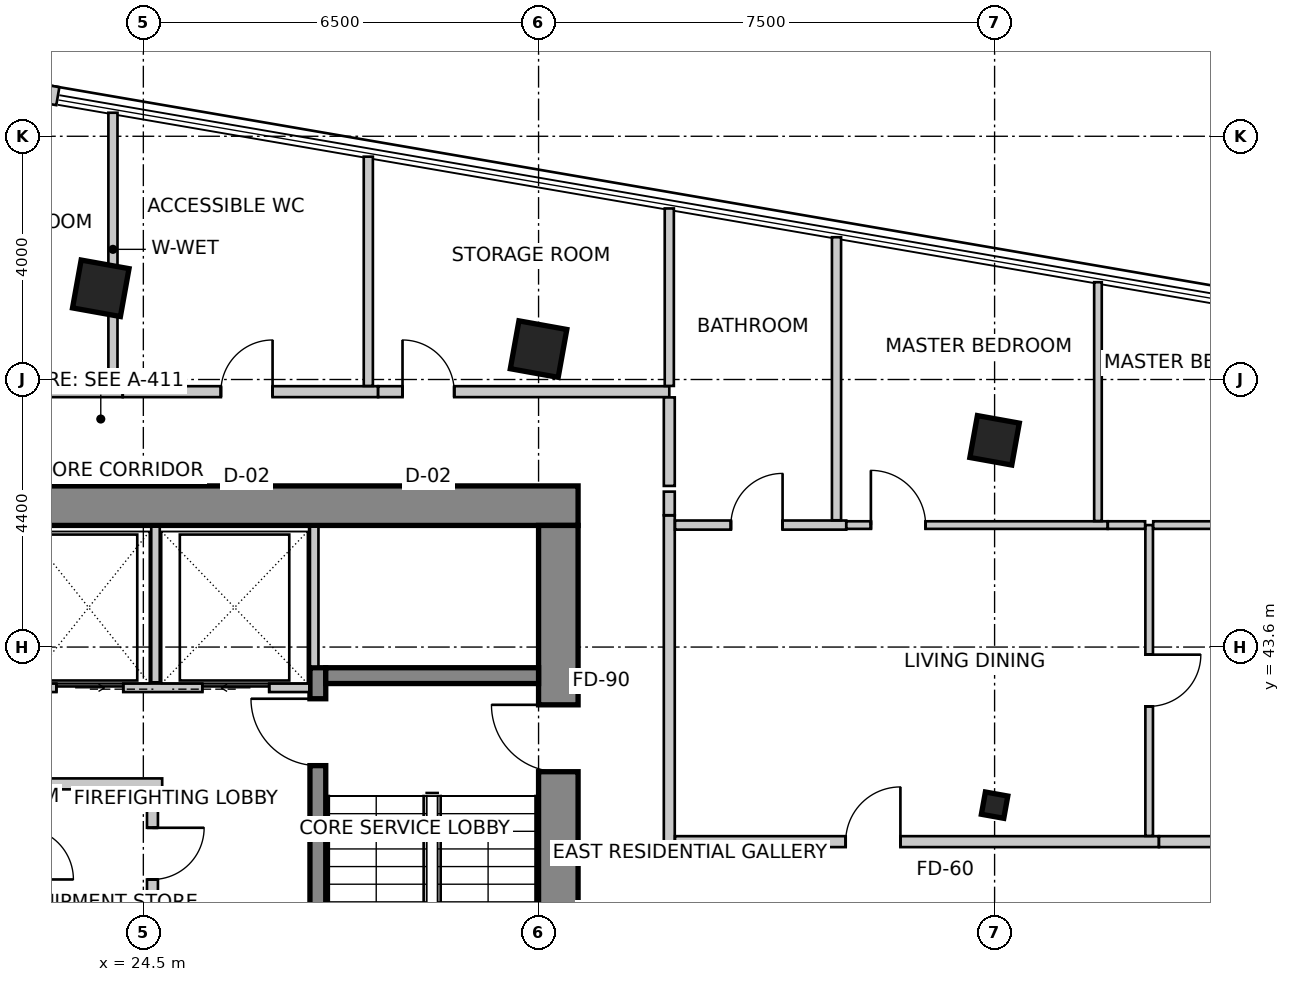
"""IFC4 building model, lengths in metres.
Left out: names, types, materials, properties, quantities, classifications, styles, units other than length and angle.
Written with IfcOpenShell. Run it as: python <this file> out.ifc"""

import sys

from ifc_helpers import new_model, si_unit, direction, frame, frame_2d, origin, origin_2d, place, context, subcontext, project, spatial, rectangle, i_section, extrude, source, transform, mapped, element, fill, save


model = new_model("IFC4")
c1 = context("Model", 3, precision=1e-05, world=origin(), true_north=direction((0.0, 1.0)))
c2 = subcontext(c1, "Body", "Model", "MODEL_VIEW")
j1 = project(units=[si_unit("LENGTHUNIT", "METRE"), si_unit("PLANEANGLEUNIT", "RADIAN")], contexts=[c1])
p1 = place(None, origin())
s1 = spatial("IfcSite", under=j1, at=p1, CompositionType="ELEMENT")
p2 = place(p1, origin())
s2 = spatial("IfcBuilding", under=s1, at=p2, CompositionType="ELEMENT")
p3 = place(p2, frame((0.0, 0.0, 197.4)))
s3 = spatial("IfcBuildingStorey", under=s2, at=p3, CompositionType="ELEMENT", Elevation=197.4)
p4 = place(p3, frame((15.95, 45.925, 0.0), z_axis=(0.0, 0.0, 1.0), x_axis=(1.0, 0.0, 0.0)))
e1 = element("IfcWall", 1, at=p4, inside=s3, PredefinedType="SHEAR", context=c2, shape_type="SweptSolid", body=[
    extrude(rectangle(XDim=15.7, YDim=0.65, at=frame_2d((7.85, 0.0))), origin(), (0.0, 0.0, 1.0), 3.5),
])
p5 = place(p3, frame((31.325, 34.2, 0.0), z_axis=(0.0, 0.0, 1.0), x_axis=(0.0, 1.0, 0.0)))
e2 = element("IfcWall", 2, at=p5, inside=s3, PredefinedType="SHEAR", context=c2, shape_type="SweptSolid", body=[
    extrude(rectangle(XDim=11.4, YDim=0.65, at=frame_2d((5.7, 0.0))), origin(), (0.0, 0.0, 1.0), 3.5),
])
m1 = source(origin(), c2, "Body", "SweptSolid", [
    extrude(rectangle(XDim=1.1, YDim=2.15, at=frame_2d((0.55, 1.075))), frame((0.0, 0.335, 0.0), z_axis=(0.0, -1.0, 0.0), x_axis=(1.0, 0.0, 0.0)), (0.0, 0.0, 1.0), 0.67),
])
p6 = place(p5, frame((7.35, 0.0, 0.0)))
e3 = element("IfcOpeningElement", 3, at=p6, cuts=e2, PredefinedType="OPENING", context=c2, shape_type="MappedRepresentation", body=[
    mapped(m1, transform((0.0, 0.0, 0.0), scale=1.0)),
])
p7 = place(p3, frame((27.37, 34.2, 0.0), z_axis=(0.0, 0.0, 1.0), x_axis=(0.0, 1.0, 0.0)))
e4 = element("IfcWall", 4, at=p7, inside=s3, PredefinedType="SHEAR", context=c2, shape_type="SweptSolid", body=[
    extrude(rectangle(XDim=9.06, YDim=0.26, at=frame_2d((4.53, 0.0))), origin(), (0.0, 0.0, 1.0), 3.5),
])
m2 = source(origin(), c2, "Body", "SweptSolid", [
    extrude(rectangle(XDim=1.1, YDim=2.15, at=frame_2d((0.55, 1.075))), frame((0.0, 0.14, 0.0), z_axis=(0.0, -1.0, 0.0), x_axis=(1.0, 0.0, 0.0)), (0.0, 0.0, 1.0), 0.28),
])
p8 = place(p7, frame((7.45, 0.0, 0.0)))
e5 = element("IfcOpeningElement", 5, at=p8, cuts=e4, PredefinedType="OPENING", context=c2, shape_type="MappedRepresentation", body=[
    mapped(m2, transform((0.0, 0.0, 0.0), scale=1.0)),
])
p9 = place(p3, frame((27.5, 43.13, 0.0), z_axis=(0.0, 0.0, 1.0), x_axis=(1.0, 0.0, 0.0)))
e6 = element("IfcWall", 6, at=p9, inside=s3, PredefinedType="SHEAR", context=c2, shape_type="SweptSolid", body=[
    extrude(rectangle(XDim=3.5, YDim=0.26, at=frame_2d((1.75, 0.0))), origin(), (0.0, 0.0, 1.0), 3.5),
])
m3 = source(origin(), c2, "Body", "SweptSolid", [
    extrude(rectangle(XDim=0.8, YDim=0.8, at=origin_2d()), origin(), (0.0, 0.0, 1.0), 3.5),
])
for number, where, z_axis, x_axis in (
    (7, (23.8, 49.5, 0.0), (0.0, 0.0, 1.0), (0.984, -0.177, 0.0)),
    (8, (31.0, 48.5, 0.0), (0.0, 0.0, 1.0), (0.984, -0.177, 0.0)),
):
    element("IfcColumn", number, at=place(p3, frame(where, z_axis=z_axis, x_axis=x_axis)), inside=s3, PredefinedType="COLUMN", context=c2, shape_type="MappedRepresentation", body=[
        mapped(m3, transform((0.0, 0.0, 0.0), scale=1.0)),
    ])
m4 = source(origin(), c2, "Body", "SweptSolid", [
    extrude(rectangle(XDim=0.7, YDim=0.7, at=origin_2d()), origin(), (0.0, 0.0, 1.0), 3.5),
])
p10 = place(p3, frame((38.5, 47.0, 0.0), z_axis=(0.0, 0.0, 1.0), x_axis=(0.984195607969, -0.17708474032, 0.0)))
e9 = element("IfcColumn", 9, at=p10, inside=s3, PredefinedType="COLUMN", context=c2, shape_type="MappedRepresentation", body=[
    mapped(m4, transform((0.0, 0.0, 0.0), scale=1.0)),
])
m5 = source(origin(), c2, "Body", "SweptSolid", [
    extrude(i_section(OverallWidth=0.374, OverallDepth=0.372, WebThickness=0.016, FlangeThickness=0.026, FilletRadius=0.015, at=origin_2d()), origin(), (0.0, 0.0, 1.0), 3.5),
])
p11 = place(p3, frame((38.5, 41.0, 0.0), z_axis=(0.0, 0.0, 1.0), x_axis=(0.984195607969, -0.17708474032, 0.0)))
e10 = element("IfcColumn", 10, at=p11, inside=s3, PredefinedType="COLUMN", context=c2, shape_type="MappedRepresentation", body=[
    mapped(m5, transform((0.0, 0.0, 0.0), scale=1.0)),
])
p12 = place(p3, frame((23.094, 52.66, 0.0), z_axis=(0.0, 0.0, 1.0), x_axis=(-0.985503719785, 0.169653818966, 0.0)))
e11 = element("IfcWall", 11, at=p12, inside=s3, PredefinedType="SOLIDWALL", context=c2, shape_type="SweptSolid", body=[
    extrude(rectangle(XDim=1.228, YDim=0.3, at=frame_2d((0.614, 0.0))), origin(), (0.0, 0.0, 1.0), 3.25),
])
p13 = place(p3, frame((20.37, 42.93, 0.0), z_axis=(0.0, 0.0, 1.0), x_axis=(1.0, 0.0, 0.0)))
e12 = element("IfcWall", 12, at=p13, inside=s3, PredefinedType="SOLIDWALL", context=c2, shape_type="SweptSolid", body=[
    extrude(rectangle(XDim=6.86, YDim=0.14, at=frame_2d((3.43, 0.0))), origin(), (0.0, 0.0, 1.0), 3.25),
])
m6 = source(origin(), c2, "Body", "SweptSolid", [
    extrude(rectangle(XDim=1.1, YDim=2.15, at=frame_2d((0.55, 1.075))), frame((0.0, 0.08, 0.0), z_axis=(0.0, -1.0, 0.0), x_axis=(1.0, 0.0, 0.0)), (0.0, 0.0, 1.0), 0.16),
])
p14 = place(p13, frame((0.5, 0.0, 0.0)))
e13 = element("IfcOpeningElement", 13, at=p14, cuts=e12, PredefinedType="OPENING", context=c2, shape_type="MappedRepresentation", body=[
    mapped(m6, transform((0.0, 0.0, 0.0), scale=1.0)),
])
p15 = place(p13, frame((2.7, 0.0, 0.0)))
e14 = element("IfcOpeningElement", 14, at=p15, cuts=e12, PredefinedType="OPENING", context=c2, shape_type="MappedRepresentation", body=[
    mapped(m6, transform((0.0, 0.0, 0.0), scale=1.0)),
])
p16 = place(p13, frame((5.1, 0.0, 0.0)))
e15 = element("IfcOpeningElement", 15, at=p16, cuts=e12, PredefinedType="OPENING", context=c2, shape_type="MappedRepresentation", body=[
    mapped(m6, transform((0.0, 0.0, 0.0), scale=1.0)),
])
p17 = place(p3, frame((27.31, 43.28, 0.0), z_axis=(0.0, 0.0, 1.0), x_axis=(0.0, 1.0, 0.0)))
e16 = element("IfcWall", 16, at=p17, inside=s3, PredefinedType="SOLIDWALL", context=c2, shape_type="SweptSolid", body=[
    extrude(rectangle(XDim=2.3, YDim=0.14, at=frame_2d((1.15, 0.0))), origin(), (0.0, 0.0, 1.0), 3.25),
])
p18 = place(p3, frame((24.7, 43.02, 0.0), z_axis=(0.0, 0.0, 1.0), x_axis=(0.0, 1.0, 0.0)))
e17 = element("IfcWall", 17, at=p18, inside=s3, PredefinedType="SOLIDWALL", context=c2, shape_type="SweptSolid", body=[
    extrude(rectangle(XDim=2.56, YDim=0.14, at=frame_2d((1.28, 0.0))), origin(), (0.0, 0.0, 1.0), 3.25),
])
p19 = place(p3, frame((24.81, 41.35, 0.0), z_axis=(0.0, 0.0, 1.0), x_axis=(-1.0, 0.0, 0.0)))
e18 = element("IfcWall", 18, at=p19, inside=s3, PredefinedType="PARTITIONING", context=c2, shape_type="SweptSolid", body=[
    extrude(rectangle(XDim=2.148, YDim=0.18, at=frame_2d((1.074, 0.0))), origin(), (0.0, 0.0, 1.0), 3.25),
])
p20 = place(p3, frame((24.65, 41.256, 0.0), z_axis=(0.0, 0.0, 1.0), x_axis=(0.0, -1.0, 0.0)))
e19 = element("IfcWall", 19, at=p20, inside=s3, PredefinedType="PARTITIONING", context=c2, shape_type="SweptSolid", body=[
    extrude(rectangle(XDim=2.106, YDim=0.18, at=frame_2d((1.053, 0.0))), origin(), (0.0, 0.0, 1.0), 3.25),
])
m7 = source(origin(), c2, "Body", "SweptSolid", [
    extrude(rectangle(XDim=0.85, YDim=2.15, at=frame_2d((0.425, 1.075))), frame((0.0, 0.1, 0.0), z_axis=(0.0, -1.0, 0.0), x_axis=(1.0, 0.0, 0.0)), (0.0, 0.0, 1.0), 0.2),
])
p21 = place(p20, frame((0.628, 0.0, 0.0)))
e20 = element("IfcOpeningElement", 20, at=p21, cuts=e19, PredefinedType="OPENING", context=c2, shape_type="MappedRepresentation", body=[
    mapped(m7, transform((0.0, 0.0, 0.0), scale=1.0)),
])
p22 = place(p3, frame((14.453, 47.8, 0.0), z_axis=(0.0, 0.0, 1.0), x_axis=(1.0, 0.0, 0.0)))
e21 = element("IfcWall", 21, at=p22, inside=s3, PredefinedType="PARTITIONING", context=c2, shape_type="SweptSolid", body=[
    extrude(rectangle(XDim=9.707, YDim=0.18, at=frame_2d((4.854, 0.0))), origin(), (0.0, 0.0, 1.0), 2.919),
])
m8 = source(origin(), c2, "Body", "SweptSolid", [
    extrude(rectangle(XDim=0.9, YDim=2.15, at=frame_2d((0.45, 1.075))), frame((0.0, 0.1, 0.0), z_axis=(0.0, -1.0, 0.0), x_axis=(1.0, 0.0, 0.0)), (0.0, 0.0, 1.0), 0.2),
])
p23 = place(p22, frame((4.404, 0.0, 0.0)))
e22 = element("IfcOpeningElement", 22, at=p23, cuts=e21, PredefinedType="OPENING", context=c2, shape_type="MappedRepresentation", body=[
    mapped(m8, transform((0.0, 0.0, 0.0), scale=1.0)),
])
p24 = place(p3, frame((24.162, 47.8, 0.0), z_axis=(0.0, 0.0, 1.0), x_axis=(1.0, 0.0, 0.0)))
e23 = element("IfcWall", 23, at=p24, inside=s3, PredefinedType="PARTITIONING", context=c2, shape_type="SweptSolid", body=[
    extrude(rectangle(XDim=4.198, YDim=0.18, at=frame_2d((2.099, 0.0))), origin(), (0.0, 0.0, 1.0), 3.25),
])
p25 = place(p24, frame((1.613, 0.0, 0.0)))
e24 = element("IfcOpeningElement", 24, at=p25, cuts=e23, PredefinedType="OPENING", context=c2, shape_type="MappedRepresentation", body=[
    mapped(m7, transform((0.0, 0.0, 0.0), scale=1.0)),
])
p26 = place(p3, frame((28.362, 47.8, 0.0), z_axis=(0.0, 0.0, 1.0), x_axis=(1.0, 0.0, 0.0)))
e25 = element("IfcWall", 25, at=p26, inside=s3, PredefinedType="PARTITIONING", context=c2, shape_type="SweptSolid", body=[
    extrude(rectangle(XDim=4.788, YDim=0.18, at=frame_2d((2.394, 0.0))), origin(), (0.0, 0.0, 1.0), 2.779),
])
p27 = place(p26, frame((0.401, 0.0, 0.0)))
e26 = element("IfcOpeningElement", 26, at=p27, cuts=e25, PredefinedType="OPENING", context=c2, shape_type="MappedRepresentation", body=[
    mapped(m7, transform((0.0, 0.0, 0.0), scale=1.0)),
])
p28 = place(p3, frame((33.15, 47.706, 0.0), z_axis=(0.0, 0.0, 1.0), x_axis=(0.0, -1.0, 0.0)))
e27 = element("IfcWall", 27, at=p28, inside=s3, PredefinedType="PARTITIONING", context=c2, shape_type="SweptSolid", body=[
    extrude(rectangle(XDim=1.456, YDim=0.18, at=frame_2d((0.728, 0.0))), origin(), (0.0, 0.0, 1.0), 2.779),
])
p29 = place(p3, frame((33.15, 45.766, 0.0), z_axis=(0.0, 0.0, 1.0), x_axis=(0.0, -1.0, 0.0)))
e28 = element("IfcWall", 28, at=p29, inside=s3, PredefinedType="PARTITIONING", context=c2, shape_type="SweptSolid", body=[
    extrude(rectangle(XDim=5.526, YDim=0.18, at=frame_2d((2.763, 0.0))), origin(), (0.0, 0.0, 1.0), 2.779),
])
p30 = place(p3, frame((33.15, 46.156, 0.0), z_axis=(0.0, 0.0, 1.0), x_axis=(0.0, -1.0, 0.0)))
e29 = element("IfcWall", 29, at=p30, inside=s3, PredefinedType="PARTITIONING", context=c2, shape_type="SweptSolid", body=[
    extrude(rectangle(XDim=0.388, YDim=0.18, at=frame_2d((0.194, 0.0))), origin(), (0.0, 0.0, 1.0), 2.919),
])
p31 = place(p3, frame((24.0, 52.387, 0.0), z_axis=(0.0, 0.0, 1.0), x_axis=(0.0, -1.0, 0.0)))
e30 = element("IfcWall", 30, at=p31, inside=s3, PredefinedType="PARTITIONING", context=c2, shape_type="SweptSolid", body=[
    extrude(rectangle(XDim=4.493, YDim=0.15, at=frame_2d((2.247, 0.0))), origin(), (0.0, 0.0, 1.0), 2.542),
])
p32 = place(p3, frame((28.2, 51.665, 0.0), z_axis=(0.0, 0.0, 1.0), x_axis=(0.0, -1.0, 0.0)))
e31 = element("IfcWall", 31, at=p32, inside=s3, PredefinedType="PARTITIONING", context=c2, shape_type="SweptSolid", body=[
    extrude(rectangle(XDim=3.771, YDim=0.15, at=frame_2d((1.885, 0.0))), origin(), (0.0, 0.0, 1.0), 2.542),
])
p33 = place(p3, frame((33.15, 50.813, 0.0), z_axis=(0.0, 0.0, 1.0), x_axis=(0.0, -1.0, 0.0)))
e32 = element("IfcWall", 32, at=p33, inside=s3, PredefinedType="PARTITIONING", context=c2, shape_type="SweptSolid", body=[
    extrude(rectangle(XDim=2.919, YDim=0.15, at=frame_2d((1.459, 0.0))), origin(), (0.0, 0.0, 1.0), 2.542),
])
p34 = place(p3, frame((33.244, 40.4, 0.0), z_axis=(0.0, 0.0, 1.0), x_axis=(1.0, 0.0, 0.0)))
e33 = element("IfcWall", 33, at=p34, inside=s3, PredefinedType="PARTITIONING", context=c2, shape_type="SweptSolid", body=[
    extrude(rectangle(XDim=7.958, YDim=0.18, at=frame_2d((3.979, 0.0))), origin(), (0.0, 0.0, 1.0), 2.766),
])
p35 = place(p34, frame((2.807, 0.0, 0.0)))
e34 = element("IfcOpeningElement", 34, at=p35, cuts=e33, PredefinedType="OPENING", context=c2, shape_type="MappedRepresentation", body=[
    mapped(m8, transform((0.0, 0.0, 0.0), scale=1.0)),
])
p36 = place(p3, frame((41.204, 40.4, 0.0), z_axis=(0.0, 0.0, 1.0), x_axis=(1.0, 0.0, 0.0)))
e35 = element("IfcWall", 35, at=p36, inside=s3, PredefinedType="PARTITIONING", context=c2, shape_type="SweptSolid", body=[
    extrude(rectangle(XDim=3.456, YDim=0.18, at=frame_2d((1.728, 0.0))), origin(), (0.0, 0.0, 1.0), 2.779),
])
p37 = place(p3, frame((41.042, 45.606, 0.0), z_axis=(0.0, 0.0, 1.0), x_axis=(0.0, -1.0, 0.0)))
e36 = element("IfcWall", 36, at=p37, inside=s3, PredefinedType="PARTITIONING", context=c2, shape_type="SweptSolid", body=[
    extrude(rectangle(XDim=5.112, YDim=0.125, at=frame_2d((2.556, 0.0))), origin(), (0.0, 0.0, 1.0), 2.779),
])
m9 = source(origin(), c2, "Body", "SweptSolid", [
    extrude(rectangle(XDim=0.85, YDim=2.15, at=frame_2d((0.425, 1.075))), frame((0.0, 0.073, 0.0), z_axis=(0.0, -1.0, 0.0), x_axis=(1.0, 0.0, 0.0)), (0.0, 0.0, 1.0), 0.145),
])
p38 = place(p37, frame((2.131, 0.0, 0.0)))
e37 = element("IfcOpeningElement", 37, at=p38, cuts=e36, PredefinedType="OPENING", context=c2, shape_type="MappedRepresentation", body=[
    mapped(m9, transform((0.0, 0.0, 0.0), scale=1.0)),
])
p39 = place(p3, frame((33.244, 45.606, 0.0), z_axis=(0.0, 0.0, 1.0), x_axis=(1.0, 0.0, 0.0)))
e38 = element("IfcWall", 38, at=p39, inside=s3, PredefinedType="PARTITIONING", context=c2, shape_type="SweptSolid", body=[
    extrude(rectangle(XDim=2.816, YDim=0.15, at=frame_2d((1.408, 0.0))), origin(), (0.0, 0.0, 1.0), 2.779),
])
m10 = source(origin(), c2, "Body", "SweptSolid", [
    extrude(rectangle(XDim=0.85, YDim=2.15, at=frame_2d((0.425, 1.075))), frame((0.0, 0.085, 0.0), z_axis=(0.0, -1.0, 0.0), x_axis=(1.0, 0.0, 0.0)), (0.0, 0.0, 1.0), 0.17),
])
p40 = place(p39, frame((0.919, 0.0, 0.0)))
e39 = element("IfcOpeningElement", 39, at=p40, cuts=e38, PredefinedType="OPENING", context=c2, shape_type="MappedRepresentation", body=[
    mapped(m10, transform((0.0, 0.0, 0.0), scale=1.0)),
])
p41 = place(p3, frame((36.062, 45.606, 0.0), z_axis=(0.0, 0.0, 1.0), x_axis=(1.0, 0.0, 0.0)))
e40 = element("IfcWall", 40, at=p41, inside=s3, PredefinedType="PARTITIONING", context=c2, shape_type="SweptSolid", body=[
    extrude(rectangle(XDim=4.298, YDim=0.125, at=frame_2d((2.149, 0.0))), origin(), (0.0, 0.0, 1.0), 2.766),
])
m11 = source(origin(), c2, "Body", "SweptSolid", [
    extrude(rectangle(XDim=0.9, YDim=2.15, at=frame_2d((0.45, 1.075))), frame((0.0, 0.073, 0.0), z_axis=(0.0, -1.0, 0.0), x_axis=(1.0, 0.0, 0.0)), (0.0, 0.0, 1.0), 0.145),
])
p42 = place(p41, frame((0.403, 0.0, 0.0)))
e41 = element("IfcOpeningElement", 41, at=p42, cuts=e40, PredefinedType="OPENING", context=c2, shape_type="MappedRepresentation", body=[
    mapped(m11, transform((0.0, 0.0, 0.0), scale=1.0)),
])
p43 = place(p3, frame((40.362, 45.606, 0.0), z_axis=(0.0, 0.0, 1.0), x_axis=(1.0, 0.0, 0.0)))
e42 = element("IfcWall", 42, at=p43, inside=s3, PredefinedType="PARTITIONING", context=c2, shape_type="SweptSolid", body=[
    extrude(rectangle(XDim=0.614, YDim=0.125, at=frame_2d((0.307, 0.0))), origin(), (0.0, 0.0, 1.0), 3.25),
])
p44 = place(p3, frame((41.108, 45.606, 0.0), z_axis=(0.0, 0.0, 1.0), x_axis=(1.0, 0.0, 0.0)))
e43 = element("IfcWall", 43, at=p44, inside=s3, PredefinedType="PARTITIONING", context=c2, shape_type="SweptSolid", body=[
    extrude(rectangle(XDim=3.392, YDim=0.125, at=frame_2d((1.696, 0.0))), origin(), (0.0, 0.0, 1.0), 3.25),
])
p45 = place(p44, frame((1.246, 0.0, 0.0)))
e44 = element("IfcOpeningElement", 44, at=p45, cuts=e43, PredefinedType="OPENING", context=c2, shape_type="MappedRepresentation", body=[
    mapped(m11, transform((0.0, 0.0, 0.0), scale=1.0)),
])
p46 = place(p3, frame((35.9, 50.34, 0.0), z_axis=(0.0, 0.0, 1.0), x_axis=(0.0, -1.0, 0.0)))
e45 = element("IfcWall", 45, at=p46, inside=s3, PredefinedType="PARTITIONING", context=c2, shape_type="SweptSolid", body=[
    extrude(rectangle(XDim=4.655, YDim=0.15, at=frame_2d((2.327, 0.0))), origin(), (0.0, 0.0, 1.0), 2.542),
])
p47 = place(p3, frame((40.2, 49.6, 0.0), z_axis=(0.0, 0.0, 1.0), x_axis=(0.0, -1.0, 0.0)))
e46 = element("IfcWall", 46, at=p47, inside=s3, PredefinedType="PARTITIONING", context=c2, shape_type="SweptSolid", body=[
    extrude(rectangle(XDim=3.927, YDim=0.125, at=frame_2d((1.964, 0.0))), origin(), (0.0, 0.0, 1.0), 2.542),
])
m12 = source(origin(), c2, "Body", "SweptSolid", [
    extrude(rectangle(XDim=1.1, YDim=2.15, at=frame_2d((0.55, 1.075))), frame((0.0, 0.025, 0.0), z_axis=(0.0, -1.0, 0.0), x_axis=(1.0, 0.0, 0.0)), (0.0, 0.0, 1.0), 0.05),
])
p48 = place(p15, origin())
e47 = element("IfcDoor", 47, at=p48, inside=s3, OperationType="SLIDING_TO_RIGHT", PredefinedType="DOOR", context=c2, shape_type="MappedRepresentation", body=[
    mapped(m12, transform((0.0, 0.0, 0.0), scale=1.0)),
])
fill(e14, e47)
m13 = source(origin(), c2, "Body", "SweptSolid", [
    extrude(rectangle(XDim=1.1, YDim=2.15, at=frame_2d((0.55, 1.075))), frame((0.0, 0.025, 0.0), z_axis=(0.0, -1.0, 0.0), x_axis=(1.0, 0.0, 0.0)), (0.0, 0.0, 1.0), 0.05),
])
p49 = place(p16, origin())
e48 = element("IfcDoor", 48, at=p49, inside=s3, OperationType="SLIDING_TO_LEFT", PredefinedType="DOOR", context=c2, shape_type="MappedRepresentation", body=[
    mapped(m13, transform((0.0, 0.0, 0.0), scale=1.0)),
])
fill(e15, e48)
m14 = source(origin(), c2, "Body", "SweptSolid", [
    extrude(rectangle(XDim=1.1, YDim=2.15, at=frame_2d((0.55, 1.075))), frame((0.0, 0.025, 0.0), z_axis=(0.0, -1.0, 0.0), x_axis=(1.0, 0.0, 0.0)), (0.0, 0.0, 1.0), 0.05),
])
p50 = place(p8, origin())
e49 = element("IfcDoor", 49, at=p50, inside=s3, OperationType="SINGLE_SWING_RIGHT", PredefinedType="DOOR", context=c2, shape_type="MappedRepresentation", body=[
    mapped(m14, transform((0.0, 0.0, 0.0), scale=1.0)),
])
fill(e5, e49)
p51 = place(p6, origin())
e50 = element("IfcDoor", 50, at=p51, inside=s3, OperationType="SINGLE_SWING_RIGHT", PredefinedType="DOOR", context=c2, shape_type="MappedRepresentation", body=[
    mapped(m14, transform((0.0, 0.0, 0.0), scale=1.0)),
])
fill(e3, e50)
m15 = source(origin(), c2, "Body", "SweptSolid", [
    extrude(rectangle(XDim=0.85, YDim=2.15, at=frame_2d((0.425, 1.075))), frame((0.0, 0.025, 0.0), z_axis=(0.0, -1.0, 0.0), x_axis=(1.0, 0.0, 0.0)), (0.0, 0.0, 1.0), 0.05),
])
p52 = place(p21, origin())
e51 = element("IfcDoor", 51, at=p52, inside=s3, OperationType="SINGLE_SWING_LEFT", PredefinedType="DOOR", context=c2, shape_type="MappedRepresentation", body=[
    mapped(m15, transform((0.0, 0.0, 0.0), scale=1.0)),
])
fill(e20, e51)
m16 = source(origin(), c2, "Body", "SweptSolid", [
    extrude(rectangle(XDim=0.85, YDim=2.15, at=frame_2d((0.425, 1.075))), frame((0.0, 0.025, 0.0), z_axis=(0.0, -1.0, 0.0), x_axis=(1.0, 0.0, 0.0)), (0.0, 0.0, 1.0), 0.05),
])
p53 = place(p25, origin())
e52 = element("IfcDoor", 52, at=p53, inside=s3, OperationType="SINGLE_SWING_RIGHT", PredefinedType="DOOR", context=c2, shape_type="MappedRepresentation", body=[
    mapped(m16, transform((0.0, 0.0, 0.0), scale=1.0)),
])
fill(e24, e52)
p54 = place(p27, origin())
e53 = element("IfcDoor", 53, at=p54, inside=s3, OperationType="SINGLE_SWING_LEFT", PredefinedType="DOOR", context=c2, shape_type="MappedRepresentation", body=[
    mapped(m16, transform((0.0, 0.0, 0.0), scale=1.0)),
])
fill(e26, e53)
m17 = source(origin(), c2, "Body", "SweptSolid", [
    extrude(rectangle(XDim=0.9, YDim=2.15, at=frame_2d((0.45, 1.075))), frame((0.0, 0.025, 0.0), z_axis=(0.0, -1.0, 0.0), x_axis=(1.0, 0.0, 0.0)), (0.0, 0.0, 1.0), 0.05),
])
p55 = place(p35, origin())
e54 = element("IfcDoor", 54, at=p55, inside=s3, OperationType="SINGLE_SWING_RIGHT", PredefinedType="DOOR", context=c2, shape_type="MappedRepresentation", body=[
    mapped(m17, transform((0.0, 0.0, 0.0), scale=1.0)),
])
fill(e34, e54)
p56 = place(p38, origin())
e55 = element("IfcDoor", 55, at=p56, inside=s3, OperationType="SINGLE_SWING_LEFT", PredefinedType="DOOR", context=c2, shape_type="MappedRepresentation", body=[
    mapped(m16, transform((0.0, 0.0, 0.0), scale=1.0)),
])
fill(e37, e55)
p57 = place(p40, origin())
e56 = element("IfcDoor", 56, at=p57, inside=s3, OperationType="SINGLE_SWING_RIGHT", PredefinedType="DOOR", context=c2, shape_type="MappedRepresentation", body=[
    mapped(m16, transform((0.0, 0.0, 0.0), scale=1.0)),
])
fill(e39, e56)
m18 = source(origin(), c2, "Body", "SweptSolid", [
    extrude(rectangle(XDim=0.9, YDim=2.15, at=frame_2d((0.45, 1.075))), frame((0.0, 0.025, 0.0), z_axis=(0.0, -1.0, 0.0), x_axis=(1.0, 0.0, 0.0)), (0.0, 0.0, 1.0), 0.05),
])
p58 = place(p42, origin())
e57 = element("IfcDoor", 57, at=p58, inside=s3, OperationType="SINGLE_SWING_LEFT", PredefinedType="DOOR", context=c2, shape_type="MappedRepresentation", body=[
    mapped(m18, transform((0.0, 0.0, 0.0), scale=1.0)),
])
fill(e41, e57)
save(model, sys.argv[1])
